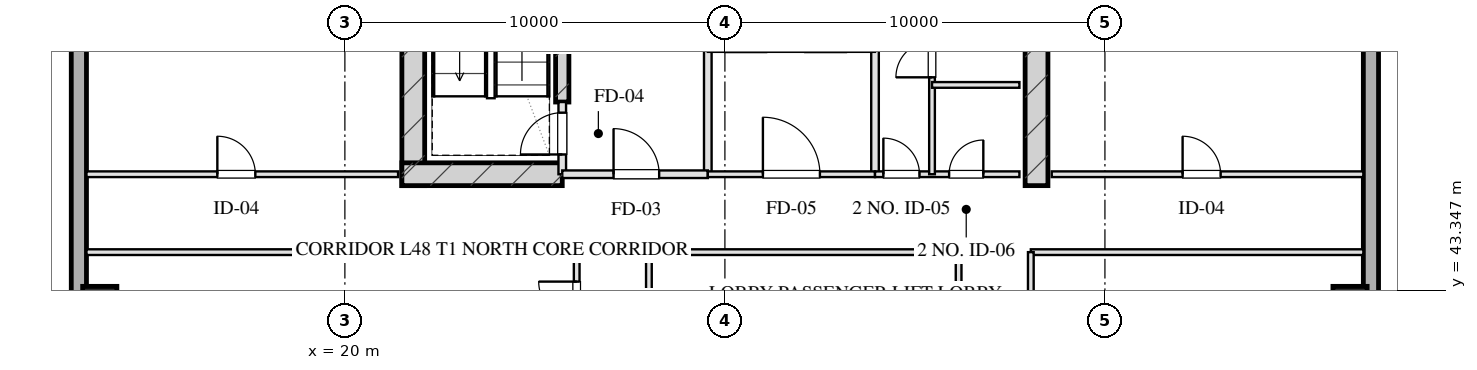
"""IFC4 building model, lengths in metres.
Left out: names, types, materials, properties, quantities, classifications, styles, units other than length and angle.
Written with IfcOpenShell. Run it as: python <this file> out.ifc"""

import sys

from ifc_helpers import new_model, si_unit, direction, frame, frame_2d, origin, origin_2d, place, context, subcontext, project, spatial, rectangle, hollow_rectangle, extrude, element, fill, save


model = new_model("IFC4")
c1 = context("Model", 3, precision=1e-05, world=origin(), true_north=direction((0.0, 1.0)))
c2 = subcontext(c1, "Body", "Model", "MODEL_VIEW")
j1 = project(units=[si_unit("LENGTHUNIT", "METRE"), si_unit("PLANEANGLEUNIT", "RADIAN")], contexts=[c1])
p1 = place(None, origin())
s1 = spatial("IfcSite", under=j1, at=p1, CompositionType="ELEMENT")
p2 = place(p1, origin())
s2 = spatial("IfcBuilding", under=s1, at=p2, CompositionType="ELEMENT")
p3 = place(p2, frame((0.0, 0.0, 180.55)))
s3 = spatial("IfcBuildingStorey", under=s2, at=p3, CompositionType="ELEMENT", Elevation=180.55)
for number, where, z_axis, x_axis in (
    (1, (21.8, 46.1, 0.0), (0.0, 0.0, 1.0), (0.0, 1.0, 0.0)),
    (2, (38.2, 46.1, 0.0), (0.0, 0.0, 1.0), (0.0, 1.0, 0.0)),
):
    element("IfcWall", number, at=place(p3, frame(where, z_axis=z_axis, x_axis=x_axis)), inside=s3, PredefinedType="SHEAR", context=c2, shape_type="SweptSolid", body=[
        extrude(rectangle(XDim=9.48, YDim=0.6, at=frame_2d((4.74, 0.0))), origin(), (0.0, 0.0, 1.0), 3.45),
    ])
p4 = place(p3, frame((25.72, 48.3, 0.0), z_axis=(0.0, 0.0, 1.0), x_axis=(0.0, 1.0, 0.0)))
e3 = element("IfcWall", 3, at=p4, inside=s3, PredefinedType="SHEAR", context=c2, shape_type="SweptSolid", body=[
    extrude(rectangle(XDim=6.98, YDim=0.35, at=frame_2d((3.49, 0.0))), origin(), (0.0, 0.0, 1.0), 3.45),
])
p5 = place(p3, frame((21.5, 46.4, 0.0), z_axis=(0.0, 0.0, 1.0), x_axis=(1.0, 0.0, 0.0)))
e4 = element("IfcWall", 4, at=p5, inside=s3, PredefinedType="SHEAR", context=c2, shape_type="SweptSolid", body=[
    extrude(rectangle(XDim=4.22, YDim=0.6, at=frame_2d((2.11, 0.0))), origin(), (0.0, 0.0, 1.0), 3.45),
])
for number, where, z_axis, x_axis in (
    (5, (13.55, 43.0, 0.0), (0.0, 0.0, 1.0), (1.0, 0.0, 0.0)),
    (6, (46.45, 43.0, 0.0), (0.0, 0.0, 1.0), (1.0, 0.0, 0.0)),
):
    element("IfcColumn", number, at=place(p3, frame(where, z_axis=z_axis, x_axis=x_axis)), inside=s3, PredefinedType="COLUMN", context=c2, shape_type="SweptSolid", body=[
        extrude(hollow_rectangle(XDim=0.9, YDim=0.9, WallThickness=0.032, at=origin_2d()), origin(), (0.0, 0.0, 1.0), 3.451),
    ])
p6 = place(p3, frame((13.0, 10.8, 0.0), z_axis=(0.0, 0.0, 1.0), x_axis=(0.0, 1.0, 0.0)))
e7 = element("IfcWall", 7, at=p6, inside=s3, PredefinedType="SOLIDWALL", context=c2, shape_type="SweptSolid", body=[
    extrude(rectangle(XDim=46.4, YDim=0.4, at=frame_2d((23.2, 0.0))), origin(), (0.0, 0.0, 1.0), 2.55),
])
p7 = place(p6, frame((15.75, 0.0, 0.75)))
e8 = element("IfcOpeningElement", 8, at=p7, cuts=e7, PredefinedType="OPENING", context=c2, shape_type="SweptSolid", body=[
    extrude(rectangle(XDim=2.1, YDim=1.4, at=frame_2d((1.05, 0.7))), frame((0.0, 0.21, 0.0), z_axis=(0.0, -1.0, 0.0), x_axis=(1.0, 0.0, 0.0)), (0.0, 0.0, 1.0), 0.42),
])
p8 = place(p6, frame((19.55, 0.0, 0.75)))
e9 = element("IfcOpeningElement", 9, at=p8, cuts=e7, PredefinedType="OPENING", context=c2, shape_type="SweptSolid", body=[
    extrude(rectangle(XDim=2.1, YDim=1.4, at=frame_2d((1.05, 0.7))), frame((0.0, 0.21, 0.0), z_axis=(0.0, -1.0, 0.0), x_axis=(1.0, 0.0, 0.0)), (0.0, 0.0, 1.0), 0.42),
])
p9 = place(p6, frame((24.75, 0.0, 0.75)))
e10 = element("IfcOpeningElement", 10, at=p9, cuts=e7, PredefinedType="OPENING", context=c2, shape_type="SweptSolid", body=[
    extrude(rectangle(XDim=2.1, YDim=1.4, at=frame_2d((1.05, 0.7))), frame((0.0, 0.21, 0.0), z_axis=(0.0, -1.0, 0.0), x_axis=(1.0, 0.0, 0.0)), (0.0, 0.0, 1.0), 0.42),
])
p10 = place(p6, frame((28.55, 0.0, 0.75)))
e11 = element("IfcOpeningElement", 11, at=p10, cuts=e7, PredefinedType="OPENING", context=c2, shape_type="SweptSolid", body=[
    extrude(rectangle(XDim=2.1, YDim=1.4, at=frame_2d((1.05, 0.7))), frame((0.0, 0.21, 0.0), z_axis=(0.0, -1.0, 0.0), x_axis=(1.0, 0.0, 0.0)), (0.0, 0.0, 1.0), 0.42),
])
p11 = place(p3, frame((47.0, 57.2, 0.0), z_axis=(0.0, 0.0, 1.0), x_axis=(0.0, -1.0, 0.0)))
e12 = element("IfcWall", 12, at=p11, inside=s3, PredefinedType="SOLIDWALL", context=c2, shape_type="SweptSolid", body=[
    extrude(rectangle(XDim=46.4, YDim=0.4, at=frame_2d((23.2, 0.0))), origin(), (0.0, 0.0, 1.0), 2.55),
])
p12 = place(p11, frame((28.55, 0.0, 0.75)))
e13 = element("IfcOpeningElement", 13, at=p12, cuts=e12, PredefinedType="OPENING", context=c2, shape_type="SweptSolid", body=[
    extrude(rectangle(XDim=2.1, YDim=1.4, at=frame_2d((1.05, 0.7))), frame((0.0, 0.21, 0.0), z_axis=(0.0, -1.0, 0.0), x_axis=(1.0, 0.0, 0.0)), (0.0, 0.0, 1.0), 0.42),
])
p13 = place(p11, frame((24.75, 0.0, 0.75)))
e14 = element("IfcOpeningElement", 14, at=p13, cuts=e12, PredefinedType="OPENING", context=c2, shape_type="SweptSolid", body=[
    extrude(rectangle(XDim=2.1, YDim=1.4, at=frame_2d((1.05, 0.7))), frame((0.0, 0.21, 0.0), z_axis=(0.0, -1.0, 0.0), x_axis=(1.0, 0.0, 0.0)), (0.0, 0.0, 1.0), 0.42),
])
p14 = place(p11, frame((19.55, 0.0, 0.75)))
e15 = element("IfcOpeningElement", 15, at=p14, cuts=e12, PredefinedType="OPENING", context=c2, shape_type="SweptSolid", body=[
    extrude(rectangle(XDim=2.1, YDim=1.4, at=frame_2d((1.05, 0.7))), frame((0.0, 0.21, 0.0), z_axis=(0.0, -1.0, 0.0), x_axis=(1.0, 0.0, 0.0)), (0.0, 0.0, 1.0), 0.42),
])
p15 = place(p11, frame((15.75, 0.0, 0.75)))
e16 = element("IfcOpeningElement", 16, at=p15, cuts=e12, PredefinedType="OPENING", context=c2, shape_type="SweptSolid", body=[
    extrude(rectangle(XDim=2.1, YDim=1.4, at=frame_2d((1.05, 0.7))), frame((0.0, 0.21, 0.0), z_axis=(0.0, -1.0, 0.0), x_axis=(1.0, 0.0, 0.0)), (0.0, 0.0, 1.0), 0.42),
])
p16 = place(p3, frame((25.72, 46.4, 0.0), z_axis=(0.0, 0.0, 1.0), x_axis=(0.0, 1.0, 0.0)))
e17 = element("IfcWall", 17, at=p16, inside=s3, PredefinedType="PARTITIONING", context=c2, shape_type="SweptSolid", body=[
    extrude(rectangle(XDim=1.9, YDim=0.2, at=frame_2d((0.95, 0.0))), origin(), (0.0, 0.0, 1.0), 3.155),
])
p17 = place(p16, frame((0.52, 0.0, 0.0)))
e18 = element("IfcOpeningElement", 18, at=p17, cuts=e17, PredefinedType="OPENING", context=c2, shape_type="SweptSolid", body=[
    extrude(rectangle(XDim=1.1, YDim=2.05, at=frame_2d((0.55, 1.025))), frame((0.0, 0.11, 0.0), z_axis=(0.0, -1.0, 0.0), x_axis=(1.0, 0.0, 0.0)), (0.0, 0.0, 1.0), 0.22),
])
p18 = place(p3, frame((29.55, 46.4, 0.0), z_axis=(0.0, 0.0, 1.0), x_axis=(0.0, 1.0, 0.0)))
e19 = element("IfcWall", 19, at=p18, inside=s3, PredefinedType="PARTITIONING", context=c2, shape_type="SweptSolid", body=[
    extrude(rectangle(XDim=8.43, YDim=0.2, at=frame_2d((4.215, 0.0))), origin(), (0.0, 0.0, 1.0), 3.155),
])
p19 = place(p3, frame((25.72, 46.4, 0.0), z_axis=(0.0, 0.0, 1.0), x_axis=(1.0, 0.0, 0.0)))
e20 = element("IfcWall", 20, at=p19, inside=s3, PredefinedType="PARTITIONING", context=c2, shape_type="SweptSolid", body=[
    extrude(rectangle(XDim=3.83, YDim=0.2, at=frame_2d((1.915, 0.0))), origin(), (0.0, 0.0, 1.0), 3.155),
])
p20 = place(p19, frame((1.35, 0.0, 0.0)))
e21 = element("IfcOpeningElement", 21, at=p20, cuts=e20, PredefinedType="OPENING", context=c2, shape_type="SweptSolid", body=[
    extrude(rectangle(XDim=1.2, YDim=2.05, at=frame_2d((0.6, 1.025))), frame((0.0, 0.11, 0.0), z_axis=(0.0, -1.0, 0.0), x_axis=(1.0, 0.0, 0.0)), (0.0, 0.0, 1.0), 0.22),
])
p21 = place(p3, frame((33.95, 46.4, 0.0), z_axis=(0.0, 0.0, 1.0), x_axis=(0.0, 1.0, 0.0)))
e22 = element("IfcWall", 22, at=p21, inside=s3, PredefinedType="PARTITIONING", context=c2, shape_type="SweptSolid", body=[
    extrude(rectangle(XDim=8.43, YDim=0.2, at=frame_2d((4.215, 0.0))), origin(), (0.0, 0.0, 1.0), 3.155),
])
p22 = place(p3, frame((29.55, 46.4, 0.0), z_axis=(0.0, 0.0, 1.0), x_axis=(1.0, 0.0, 0.0)))
e23 = element("IfcWall", 23, at=p22, inside=s3, PredefinedType="PARTITIONING", context=c2, shape_type="SweptSolid", body=[
    extrude(rectangle(XDim=4.4, YDim=0.15, at=frame_2d((2.2, 0.0))), origin(), (0.0, 0.0, 1.0), 3.155),
])
p23 = place(p22, frame((1.45, 0.0, 0.0)))
e24 = element("IfcOpeningElement", 24, at=p23, cuts=e23, PredefinedType="OPENING", context=c2, shape_type="SweptSolid", body=[
    extrude(rectangle(XDim=1.5, YDim=2.05, at=frame_2d((0.75, 1.025))), frame((0.0, 0.085, 0.0), z_axis=(0.0, -1.0, 0.0), x_axis=(1.0, 0.0, 0.0)), (0.0, 0.0, 1.0), 0.17),
])
p24 = place(p3, frame((29.55, 49.72, 0.0), z_axis=(0.0, 0.0, 1.0), x_axis=(1.0, 0.0, 0.0)))
e25 = element("IfcWall", 25, at=p24, inside=s3, PredefinedType="PARTITIONING", context=c2, shape_type="SweptSolid", body=[
    extrude(rectangle(XDim=4.4, YDim=0.2, at=frame_2d((2.2, 0.0))), origin(), (0.0, 0.0, 1.0), 3.155),
])
p25 = place(p24, frame((0.45, 0.0, 0.0)))
e26 = element("IfcOpeningElement", 26, at=p25, cuts=e25, PredefinedType="OPENING", context=c2, shape_type="SweptSolid", body=[
    extrude(rectangle(XDim=1.1, YDim=2.05, at=frame_2d((0.55, 1.025))), frame((0.0, 0.11, 0.0), z_axis=(0.0, -1.0, 0.0), x_axis=(1.0, 0.0, 0.0)), (0.0, 0.0, 1.0), 0.22),
])
p26 = place(p24, frame((2.55, 0.0, 0.0)))
e27 = element("IfcOpeningElement", 27, at=p26, cuts=e25, PredefinedType="OPENING", context=c2, shape_type="SweptSolid", body=[
    extrude(rectangle(XDim=1.1, YDim=2.05, at=frame_2d((0.55, 1.025))), frame((0.0, 0.11, 0.0), z_axis=(0.0, -1.0, 0.0), x_axis=(1.0, 0.0, 0.0)), (0.0, 0.0, 1.0), 0.22),
])
p27 = place(p3, frame((33.95, 46.4, 0.0), z_axis=(0.0, 0.0, 1.0), x_axis=(1.0, 0.0, 0.0)))
e28 = element("IfcWall", 28, at=p27, inside=s3, PredefinedType="PARTITIONING", context=c2, shape_type="SweptSolid", body=[
    extrude(rectangle(XDim=3.8, YDim=0.15, at=frame_2d((1.9, 0.0))), origin(), (0.0, 0.0, 1.0), 3.155),
])
p28 = place(p27, frame((0.22, 0.0, 0.0)))
e29 = element("IfcOpeningElement", 29, at=p28, cuts=e28, PredefinedType="OPENING", context=c2, shape_type="SweptSolid", body=[
    extrude(rectangle(XDim=0.95, YDim=2.05, at=frame_2d((0.475, 1.025))), frame((0.0, 0.085, 0.0), z_axis=(0.0, -1.0, 0.0), x_axis=(1.0, 0.0, 0.0)), (0.0, 0.0, 1.0), 0.17),
])
p29 = place(p27, frame((1.95, 0.0, 0.0)))
e30 = element("IfcOpeningElement", 30, at=p29, cuts=e28, PredefinedType="OPENING", context=c2, shape_type="SweptSolid", body=[
    extrude(rectangle(XDim=0.9, YDim=2.05, at=frame_2d((0.45, 1.025))), frame((0.0, 0.085, 0.0), z_axis=(0.0, -1.0, 0.0), x_axis=(1.0, 0.0, 0.0)), (0.0, 0.0, 1.0), 0.17),
])
p30 = place(p3, frame((35.45, 46.4, 0.0), z_axis=(0.0, 0.0, 1.0), x_axis=(0.0, 1.0, 0.0)))
e31 = element("IfcWall", 31, at=p30, inside=s3, PredefinedType="PARTITIONING", context=c2, shape_type="SweptSolid", body=[
    extrude(rectangle(XDim=8.43, YDim=0.15, at=frame_2d((4.215, 0.0))), origin(), (0.0, 0.0, 1.0), 2.745),
])
p31 = place(p30, frame((2.55, 0.0, 0.0)))
e32 = element("IfcOpeningElement", 32, at=p31, cuts=e31, PredefinedType="OPENING", context=c2, shape_type="SweptSolid", body=[
    extrude(rectangle(XDim=0.95, YDim=2.05, at=frame_2d((0.475, 1.025))), frame((0.0, 0.085, 0.0), z_axis=(0.0, -1.0, 0.0), x_axis=(1.0, 0.0, 0.0)), (0.0, 0.0, 1.0), 0.17),
])
p32 = place(p30, frame((5.6, 0.0, 0.0)))
e33 = element("IfcOpeningElement", 33, at=p32, cuts=e31, PredefinedType="OPENING", context=c2, shape_type="SweptSolid", body=[
    extrude(rectangle(XDim=0.9, YDim=2.05, at=frame_2d((0.45, 1.025))), frame((0.0, 0.085, 0.0), z_axis=(0.0, -1.0, 0.0), x_axis=(1.0, 0.0, 0.0)), (0.0, 0.0, 1.0), 0.17),
])
p33 = place(p3, frame((35.45, 48.75, 0.0), z_axis=(0.0, 0.0, 1.0), x_axis=(1.0, 0.0, 0.0)))
e34 = element("IfcWall", 34, at=p33, inside=s3, PredefinedType="PARTITIONING", context=c2, shape_type="SweptSolid", body=[
    extrude(rectangle(XDim=2.3, YDim=0.15, at=frame_2d((1.15, 0.0))), origin(), (0.0, 0.0, 1.0), 3.155),
])
p34 = place(p3, frame((13.2, 46.4, 0.0), z_axis=(0.0, 0.0, 1.0), x_axis=(1.0, 0.0, 0.0)))
e35 = element("IfcWall", 35, at=p34, inside=s3, PredefinedType="PARTITIONING", context=c2, shape_type="SweptSolid", body=[
    extrude(rectangle(XDim=8.2, YDim=0.15, at=frame_2d((4.1, 0.0))), origin(), (0.0, 0.0, 1.0), 3.155),
])
p35 = place(p34, frame((3.444, 0.0, 0.0)))
e36 = element("IfcOpeningElement", 36, at=p35, cuts=e35, PredefinedType="OPENING", context=c2, shape_type="SweptSolid", body=[
    extrude(rectangle(XDim=1.0, YDim=2.05, at=frame_2d((0.5, 1.025))), frame((0.0, 0.085, 0.0), z_axis=(0.0, -1.0, 0.0), x_axis=(1.0, 0.0, 0.0)), (0.0, 0.0, 1.0), 0.17),
])
p36 = place(p3, frame((38.6, 46.4, 0.0), z_axis=(0.0, 0.0, 1.0), x_axis=(1.0, 0.0, 0.0)))
e37 = element("IfcWall", 37, at=p36, inside=s3, PredefinedType="PARTITIONING", context=c2, shape_type="SweptSolid", body=[
    extrude(rectangle(XDim=8.2, YDim=0.15, at=frame_2d((4.1, 0.0))), origin(), (0.0, 0.0, 1.0), 3.155),
])
p37 = place(p36, frame((3.444, 0.0, 0.0)))
e38 = element("IfcOpeningElement", 38, at=p37, cuts=e37, PredefinedType="OPENING", context=c2, shape_type="SweptSolid", body=[
    extrude(rectangle(XDim=1.0, YDim=2.05, at=frame_2d((0.5, 1.025))), frame((0.0, 0.085, 0.0), z_axis=(0.0, -1.0, 0.0), x_axis=(1.0, 0.0, 0.0)), (0.0, 0.0, 1.0), 0.17),
])
p38 = place(p3, frame((13.2, 44.35, 0.0), z_axis=(0.0, 0.0, 1.0), x_axis=(1.0, 0.0, 0.0)))
e39 = element("IfcWall", 39, at=p38, inside=s3, PredefinedType="PARTITIONING", context=c2, shape_type="SweptSolid", body=[
    extrude(rectangle(XDim=12.9, YDim=0.15, at=frame_2d((6.45, 0.0))), origin(), (0.0, 0.0, 1.0), 3.155),
])
p39 = place(p3, frame((28.0, 44.35, 0.0), z_axis=(0.0, 0.0, 1.0), x_axis=(1.0, 0.0, 0.0)))
e40 = element("IfcWall", 40, at=p39, inside=s3, PredefinedType="PARTITIONING", context=c2, shape_type="SweptSolid", body=[
    extrude(rectangle(XDim=8.15, YDim=0.15, at=frame_2d((4.075, 0.0))), origin(), (0.0, 0.0, 1.0), 3.155),
])
p40 = place(p3, frame((38.05, 44.35, 0.0), z_axis=(0.0, 0.0, 1.0), x_axis=(1.0, 0.0, 0.0)))
e41 = element("IfcWall", 41, at=p40, inside=s3, PredefinedType="PARTITIONING", context=c2, shape_type="SweptSolid", body=[
    extrude(rectangle(XDim=8.75, YDim=0.15, at=frame_2d((4.375, 0.0))), origin(), (0.0, 0.0, 1.0), 3.155),
])
p41 = place(p3, frame((26.1, 23.65, 0.0), z_axis=(0.0, 0.0, 1.0), x_axis=(0.0, 1.0, 0.0)))
e42 = element("IfcWall", 42, at=p41, inside=s3, PredefinedType="PARTITIONING", context=c2, shape_type="SweptSolid", body=[
    extrude(rectangle(XDim=20.7, YDim=0.15, at=frame_2d((10.35, 0.0))), origin(), (0.0, 0.0, 1.0), 3.155),
])
p42 = place(p41, frame((0.775, 0.0, 0.0)))
e43 = element("IfcOpeningElement", 43, at=p42, cuts=e42, PredefinedType="OPENING", context=c2, shape_type="SweptSolid", body=[
    extrude(rectangle(XDim=1.0, YDim=2.05, at=frame_2d((0.5, 1.025))), frame((0.0, 0.085, 0.0), z_axis=(0.0, -1.0, 0.0), x_axis=(1.0, 0.0, 0.0)), (0.0, 0.0, 1.0), 0.17),
])
p43 = place(p41, frame((3.95, 0.0, 0.0)))
e44 = element("IfcOpeningElement", 44, at=p43, cuts=e42, PredefinedType="OPENING", context=c2, shape_type="SweptSolid", body=[
    extrude(rectangle(XDim=1.0, YDim=2.05, at=frame_2d((0.5, 1.025))), frame((0.0, 0.085, 0.0), z_axis=(0.0, -1.0, 0.0), x_axis=(1.0, 0.0, 0.0)), (0.0, 0.0, 1.0), 0.17),
])
p44 = place(p41, frame((7.51, 0.0, 0.0)))
e45 = element("IfcOpeningElement", 45, at=p44, cuts=e42, PredefinedType="OPENING", context=c2, shape_type="SweptSolid", body=[
    extrude(rectangle(XDim=1.05, YDim=2.05, at=frame_2d((0.525, 1.025))), frame((0.0, 0.085, 0.0), z_axis=(0.0, -1.0, 0.0), x_axis=(1.0, 0.0, 0.0)), (0.0, 0.0, 1.0), 0.17),
])
p45 = place(p41, frame((11.51, 0.0, 0.0)))
e46 = element("IfcOpeningElement", 46, at=p45, cuts=e42, PredefinedType="OPENING", context=c2, shape_type="SweptSolid", body=[
    extrude(rectangle(XDim=1.0, YDim=2.05, at=frame_2d((0.5, 1.025))), frame((0.0, 0.085, 0.0), z_axis=(0.0, -1.0, 0.0), x_axis=(1.0, 0.0, 0.0)), (0.0, 0.0, 1.0), 0.17),
])
p46 = place(p41, frame((15.75, 0.0, 0.0)))
e47 = element("IfcOpeningElement", 47, at=p46, cuts=e42, PredefinedType="OPENING", context=c2, shape_type="SweptSolid", body=[
    extrude(rectangle(XDim=1.0, YDim=2.05, at=frame_2d((0.5, 1.025))), frame((0.0, 0.085, 0.0), z_axis=(0.0, -1.0, 0.0), x_axis=(1.0, 0.0, 0.0)), (0.0, 0.0, 1.0), 0.17),
])
p47 = place(p41, frame((18.925, 0.0, 0.0)))
e48 = element("IfcOpeningElement", 48, at=p47, cuts=e42, PredefinedType="OPENING", context=c2, shape_type="SweptSolid", body=[
    extrude(rectangle(XDim=1.0, YDim=2.05, at=frame_2d((0.5, 1.025))), frame((0.0, 0.085, 0.0), z_axis=(0.0, -1.0, 0.0), x_axis=(1.0, 0.0, 0.0)), (0.0, 0.0, 1.0), 0.17),
])
p48 = place(p3, frame((28.0, 23.65, 0.0), z_axis=(0.0, 0.0, 1.0), x_axis=(0.0, 1.0, 0.0)))
e49 = element("IfcWall", 49, at=p48, inside=s3, PredefinedType="PARTITIONING", context=c2, shape_type="SweptSolid", body=[
    extrude(rectangle(XDim=20.7, YDim=0.15, at=frame_2d((10.35, 0.0))), origin(), (0.0, 0.0, 1.0), 3.155),
])
p49 = place(p48, frame((2.857, 0.0, 0.0)))
e50 = element("IfcOpeningElement", 50, at=p49, cuts=e49, PredefinedType="OPENING", context=c2, shape_type="SweptSolid", body=[
    extrude(rectangle(XDim=1.1, YDim=2.05, at=frame_2d((0.55, 1.025))), frame((0.0, 0.085, 0.0), z_axis=(0.0, -1.0, 0.0), x_axis=(1.0, 0.0, 0.0)), (0.0, 0.0, 1.0), 0.17),
])
p50 = place(p48, frame((17.208, 0.0, 0.0)))
e51 = element("IfcOpeningElement", 51, at=p50, cuts=e49, PredefinedType="OPENING", context=c2, shape_type="SweptSolid", body=[
    extrude(rectangle(XDim=1.1, YDim=2.05, at=frame_2d((0.55, 1.025))), frame((0.0, 0.085, 0.0), z_axis=(0.0, -1.0, 0.0), x_axis=(1.0, 0.0, 0.0)), (0.0, 0.0, 1.0), 0.17),
])
p51 = place(p3, frame((36.15, 23.65, 0.0), z_axis=(0.0, 0.0, 1.0), x_axis=(0.0, 1.0, 0.0)))
e52 = element("IfcWall", 52, at=p51, inside=s3, PredefinedType="PARTITIONING", context=c2, shape_type="SweptSolid", body=[
    extrude(rectangle(XDim=20.7, YDim=0.15, at=frame_2d((10.35, 0.0))), origin(), (0.0, 0.0, 1.0), 3.155),
])
p52 = place(p51, frame((9.71, 0.0, 0.0)))
e53 = element("IfcOpeningElement", 53, at=p52, cuts=e52, PredefinedType="OPENING", context=c2, shape_type="SweptSolid", body=[
    extrude(rectangle(XDim=1.1, YDim=2.05, at=frame_2d((0.55, 1.025))), frame((0.0, 0.085, 0.0), z_axis=(0.0, -1.0, 0.0), x_axis=(1.0, 0.0, 0.0)), (0.0, 0.0, 1.0), 0.17),
])
p53 = place(p3, frame((38.05, 23.65, 0.0), z_axis=(0.0, 0.0, 1.0), x_axis=(0.0, 1.0, 0.0)))
e54 = element("IfcWall", 54, at=p53, inside=s3, PredefinedType="PARTITIONING", context=c2, shape_type="SweptSolid", body=[
    extrude(rectangle(XDim=20.7, YDim=0.15, at=frame_2d((10.35, 0.0))), origin(), (0.0, 0.0, 1.0), 3.155),
])
p54 = place(p53, frame((4.148, 0.0, 0.0)))
e55 = element("IfcOpeningElement", 55, at=p54, cuts=e54, PredefinedType="OPENING", context=c2, shape_type="SweptSolid", body=[
    extrude(rectangle(XDim=1.05, YDim=2.05, at=frame_2d((0.525, 1.025))), frame((0.0, 0.085, 0.0), z_axis=(0.0, -1.0, 0.0), x_axis=(1.0, 0.0, 0.0)), (0.0, 0.0, 1.0), 0.17),
])
p55 = place(p53, frame((14.499, 0.0, 0.0)))
e56 = element("IfcOpeningElement", 56, at=p55, cuts=e54, PredefinedType="OPENING", context=c2, shape_type="SweptSolid", body=[
    extrude(rectangle(XDim=1.0, YDim=2.05, at=frame_2d((0.5, 1.025))), frame((0.0, 0.085, 0.0), z_axis=(0.0, -1.0, 0.0), x_axis=(1.0, 0.0, 0.0)), (0.0, 0.0, 1.0), 0.17),
])
p56 = place(p17, origin())
e57 = element("IfcDoor", 57, at=p56, inside=s3, OperationType="SINGLE_SWING_LEFT", PredefinedType="DOOR", context=c2, shape_type="SweptSolid", body=[
    extrude(rectangle(XDim=1.1, YDim=2.05, at=frame_2d((0.55, 1.025))), frame((0.0, 0.025, 0.0), z_axis=(0.0, -1.0, 0.0), x_axis=(1.0, 0.0, 0.0)), (0.0, 0.0, 1.0), 0.05),
])
fill(e18, e57)
p57 = place(p20, origin())
e58 = element("IfcDoor", 58, at=p57, inside=s3, OperationType="SINGLE_SWING_LEFT", PredefinedType="DOOR", context=c2, shape_type="SweptSolid", body=[
    extrude(rectangle(XDim=1.2, YDim=2.05, at=frame_2d((0.6, 1.025))), frame((0.0, 0.025, 0.0), z_axis=(0.0, -1.0, 0.0), x_axis=(1.0, 0.0, 0.0)), (0.0, 0.0, 1.0), 0.05),
])
fill(e21, e58)
p58 = place(p23, origin())
e59 = element("IfcDoor", 59, at=p58, inside=s3, OperationType="SINGLE_SWING_LEFT", PredefinedType="DOOR", context=c2, shape_type="SweptSolid", body=[
    extrude(rectangle(XDim=1.5, YDim=2.05, at=frame_2d((0.75, 1.025))), frame((0.0, 0.025, 0.0), z_axis=(0.0, -1.0, 0.0), x_axis=(1.0, 0.0, 0.0)), (0.0, 0.0, 1.0), 0.05),
])
fill(e24, e59)
p59 = place(p28, origin())
e60 = element("IfcDoor", 60, at=p59, inside=s3, OperationType="SINGLE_SWING_LEFT", PredefinedType="DOOR", context=c2, shape_type="SweptSolid", body=[
    extrude(rectangle(XDim=0.95, YDim=2.05, at=frame_2d((0.475, 1.025))), frame((0.0, 0.025, 0.0), z_axis=(0.0, -1.0, 0.0), x_axis=(1.0, 0.0, 0.0)), (0.0, 0.0, 1.0), 0.05),
])
fill(e29, e60)
p60 = place(p29, origin())
e61 = element("IfcDoor", 61, at=p60, inside=s3, OperationType="SINGLE_SWING_RIGHT", PredefinedType="DOOR", context=c2, shape_type="SweptSolid", body=[
    extrude(rectangle(XDim=0.9, YDim=2.05, at=frame_2d((0.45, 1.025))), frame((0.0, 0.025, 0.0), z_axis=(0.0, -1.0, 0.0), x_axis=(1.0, 0.0, 0.0)), (0.0, 0.0, 1.0), 0.05),
])
fill(e30, e61)
p61 = place(p31, origin())
e62 = element("IfcDoor", 62, at=p61, inside=s3, OperationType="SINGLE_SWING_LEFT", PredefinedType="DOOR", context=c2, shape_type="SweptSolid", body=[
    extrude(rectangle(XDim=0.95, YDim=2.05, at=frame_2d((0.475, 1.025))), frame((0.0, 0.025, 0.0), z_axis=(0.0, -1.0, 0.0), x_axis=(1.0, 0.0, 0.0)), (0.0, 0.0, 1.0), 0.05),
])
fill(e32, e62)
p62 = place(p35, origin())
e63 = element("IfcDoor", 63, at=p62, inside=s3, OperationType="SINGLE_SWING_LEFT", PredefinedType="DOOR", context=c2, shape_type="SweptSolid", body=[
    extrude(rectangle(XDim=1.0, YDim=2.05, at=frame_2d((0.5, 1.025))), frame((0.0, 0.025, 0.0), z_axis=(0.0, -1.0, 0.0), x_axis=(1.0, 0.0, 0.0)), (0.0, 0.0, 1.0), 0.05),
])
fill(e36, e63)
p63 = place(p37, origin())
e64 = element("IfcDoor", 64, at=p63, inside=s3, OperationType="SINGLE_SWING_LEFT", PredefinedType="DOOR", context=c2, shape_type="SweptSolid", body=[
    extrude(rectangle(XDim=1.0, YDim=2.05, at=frame_2d((0.5, 1.025))), frame((0.0, 0.025, 0.0), z_axis=(0.0, -1.0, 0.0), x_axis=(1.0, 0.0, 0.0)), (0.0, 0.0, 1.0), 0.05),
])
fill(e38, e64)
p64 = place(p47, origin())
e65 = element("IfcDoor", 65, at=p64, inside=s3, OperationType="SINGLE_SWING_RIGHT", PredefinedType="DOOR", context=c2, shape_type="SweptSolid", body=[
    extrude(rectangle(XDim=1.0, YDim=2.05, at=frame_2d((0.5, 1.025))), frame((0.0, 0.025, 0.0), z_axis=(0.0, -1.0, 0.0), x_axis=(1.0, 0.0, 0.0)), (0.0, 0.0, 1.0), 0.05),
])
fill(e48, e65)
save(model, sys.argv[1])
